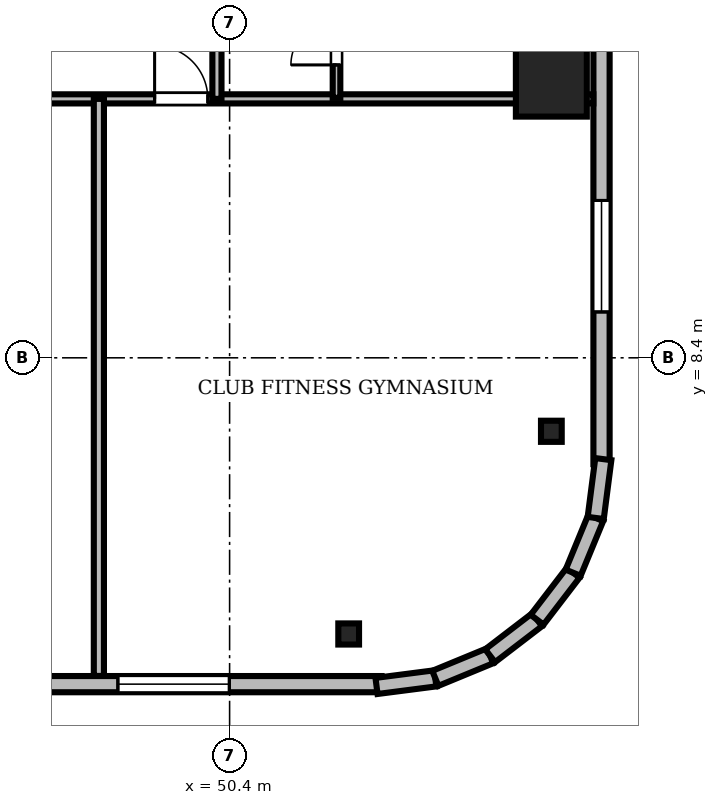
"""IFC4 building model, lengths in metres.
Left out: names, types, materials, properties, quantities, classifications, styles, units other than length and angle.
Written with IfcOpenShell. Run it as: python <this file> out.ifc"""

import sys

from ifc_helpers import new_model, si_unit, direction, frame, frame_2d, origin, origin_2d, place, context, subcontext, project, spatial, rectangle, i_section, extrude, source, transform, mapped, element, fill, save


model = new_model("IFC4")
c1 = context("Model", 3, precision=1e-05, world=origin(), true_north=direction((0.0, 1.0)))
c2 = subcontext(c1, "Body", "Model", "MODEL_VIEW")
j1 = project(units=[si_unit("LENGTHUNIT", "METRE"), si_unit("PLANEANGLEUNIT", "RADIAN")], contexts=[c1])
p1 = place(None, origin())
s1 = spatial("IfcSite", under=j1, at=p1, CompositionType="ELEMENT")
p2 = place(p1, origin())
s2 = spatial("IfcBuilding", under=s1, at=p2, CompositionType="ELEMENT")
p3 = place(p2, frame((0.0, 0.0, 184.8)))
s3 = spatial("IfcBuildingStorey", under=s2, at=p3, CompositionType="ELEMENT", Elevation=184.8)
m1 = source(origin(), c2, "Body", "SweptSolid", [
    extrude(rectangle(XDim=1.4, YDim=1.4, at=origin_2d()), origin(), (0.0, 0.0, 1.0), 3.53),
])
p4 = place(p3, frame((56.75, 13.86, 0.0), z_axis=(0.0, 0.0, 1.0), x_axis=(1.0, 0.0, 0.0)))
e1 = element("IfcColumn", 1, at=p4, inside=s3, PredefinedType="COLUMN", context=c2, shape_type="MappedRepresentation", body=[
    mapped(m1, transform((0.0, 0.0, 0.0), scale=1.0)),
])
m2 = source(origin(), c2, "Body", "SweptSolid", [
    extrude(i_section(OverallWidth=0.409, OverallDepth=0.417, WebThickness=0.021, FlangeThickness=0.033, FilletRadius=0.015, at=origin_2d()), origin(), (0.0, 0.0, 1.0), 3.53),
])
for number, where, z_axis, x_axis in (
    (2, (52.75, 2.95, 0.0), (0.0, 0.0, 1.0), (1.0, 0.0, 0.0)),
    (3, (56.75, 6.95, 0.0), (0.0, 0.0, 1.0), (1.0, 0.0, 0.0)),
):
    element("IfcColumn", number, at=place(p3, frame(where, z_axis=z_axis, x_axis=x_axis)), inside=s3, PredefinedType="COLUMN", context=c2, shape_type="MappedRepresentation", body=[
        mapped(m2, transform((0.0, 0.0, 0.0), scale=1.0)),
    ])
m3 = source(origin(), c2, "Body", "SweptSolid", [
    extrude(rectangle(XDim=15.6, YDim=0.32, at=frame_2d((7.8, 0.0))), origin(), (0.0, 0.0, 1.0), 3.53),
])
p5 = place(p3, frame((37.8, 1.96, 0.0), z_axis=(0.0, 0.0, 1.0), x_axis=(1.0, 0.0, 0.0)))
e4 = element("IfcWall", 4, at=p5, inside=s3, PredefinedType="SOLIDWALL", context=c2, shape_type="MappedRepresentation", body=[
    mapped(m3, transform((0.0, 0.0, 0.0), scale=1.0)),
])
m4 = source(origin(), c2, "Body", "SweptSolid", [
    extrude(rectangle(XDim=2.2, YDim=2.4, at=frame_2d((1.1, 1.2))), frame((0.0, 0.17, 0.0), z_axis=(0.0, -1.0, 0.0), x_axis=(1.0, 0.0, 0.0)), (0.0, 0.0, 1.0), 0.34),
])
p6 = place(p5, frame((10.395, 0.0, 0.72)))
e5 = element("IfcOpeningElement", 5, at=p6, cuts=e4, PredefinedType="OPENING", context=c2, shape_type="MappedRepresentation", body=[
    mapped(m4, transform((0.0, 0.0, 0.0), scale=1.0)),
])
m5 = source(origin(), c2, "Body", "SweptSolid", [
    extrude(rectangle(XDim=1.8, YDim=2.4, at=frame_2d((0.9, 1.2))), frame((0.0, 0.17, 0.0), z_axis=(0.0, -1.0, 0.0), x_axis=(1.0, 0.0, 0.0)), (0.0, 0.0, 1.0), 0.34),
])
p7 = place(p5, frame((6.262, 0.0, 0.72)))
e6 = element("IfcOpeningElement", 6, at=p7, cuts=e4, PredefinedType="OPENING", context=c2, shape_type="MappedRepresentation", body=[
    mapped(m5, transform((0.0, 0.0, 0.0), scale=1.0)),
])
p8 = place(p3, frame((57.74, 6.3, 0.0), z_axis=(0.0, 0.0, 1.0), x_axis=(0.0, 1.0, 0.0)))
e7 = element("IfcWall", 7, at=p8, inside=s3, PredefinedType="SOLIDWALL", context=c2, shape_type="MappedRepresentation", body=[
    mapped(m3, transform((0.0, 0.0, 0.0), scale=1.0)),
])
m6 = source(origin(), c2, "Body", "SweptSolid", [
    extrude(rectangle(XDim=1.4, YDim=2.3, at=frame_2d((0.7, 1.15))), frame((0.0, 0.17, 0.0), z_axis=(0.0, -1.0, 0.0), x_axis=(1.0, 0.0, 0.0)), (0.0, 0.0, 1.0), 0.34),
])
p9 = place(p8, frame((9.61, 0.0, 0.0)))
e8 = element("IfcOpeningElement", 8, at=p9, cuts=e7, PredefinedType="OPENING", context=c2, shape_type="MappedRepresentation", body=[
    mapped(m6, transform((0.0, 0.0, 0.0), scale=1.0)),
])
p10 = place(p8, frame((3.005, 0.0, 0.72)))
e9 = element("IfcOpeningElement", 9, at=p10, cuts=e7, PredefinedType="OPENING", context=c2, shape_type="MappedRepresentation", body=[
    mapped(m4, transform((0.0, 0.0, 0.0), scale=1.0)),
])
m7 = source(origin(), c2, "Body", "SweptSolid", [
    extrude(rectangle(XDim=1.17, YDim=0.32, at=frame_2d((0.585, 0.0))), origin(), (0.0, 0.0, 1.0), 3.53),
])
p11 = place(p3, frame((53.3, 1.925, 0.0), z_axis=(0.0, 0.0, 1.0), x_axis=(0.991762485493, 0.128090485085, 0.0)))
e10 = element("IfcWall", 10, at=p11, inside=s3, PredefinedType="SOLIDWALL", context=c2, shape_type="MappedRepresentation", body=[
    mapped(m7, transform((0.0, 0.0, 0.0), scale=1.0)),
])
m8 = source(origin(), c2, "Body", "SweptSolid", [
    extrude(rectangle(XDim=1.169, YDim=0.32, at=frame_2d((0.585, 0.0))), origin(), (0.0, 0.0, 1.0), 3.53),
])
p12 = place(p3, frame((54.46, 2.074, 0.0), z_axis=(0.0, 0.0, 1.0), x_axis=(0.924479075121, 0.381232789334, 0.0)))
e11 = element("IfcWall", 11, at=p12, inside=s3, PredefinedType="SOLIDWALL", context=c2, shape_type="MappedRepresentation", body=[
    mapped(m8, transform((0.0, 0.0, 0.0), scale=1.0)),
])
m9 = source(origin(), c2, "Body", "SweptSolid", [
    extrude(rectangle(XDim=1.169, YDim=0.32, at=frame_2d((0.584, 0.0))), origin(), (0.0, 0.0, 1.0), 3.53),
])
p13 = place(p3, frame((55.541, 2.52, 0.0), z_axis=(0.0, 0.0, 1.0), x_axis=(0.793663520347, 0.608356981114, 0.0)))
e12 = element("IfcWall", 12, at=p13, inside=s3, PredefinedType="SOLIDWALL", context=c2, shape_type="MappedRepresentation", body=[
    mapped(m9, transform((0.0, 0.0, 0.0), scale=1.0)),
])
m10 = source(origin(), c2, "Body", "SweptSolid", [
    extrude(rectangle(XDim=1.169, YDim=0.32, at=frame_2d((0.584, 0.0))), origin(), (0.0, 0.0, 1.0), 3.53),
])
for number, where, z_axis, x_axis in (
    (13, (56.469, 3.231, 0.0), (0.0, 0.0, 1.0), (0.608, 0.794, 0.0)),
    (14, (57.18, 4.159, 0.0), (0.0, 0.0, 1.0), (0.381, 0.925, 0.0)),
):
    element("IfcWall", number, at=place(p3, frame(where, z_axis=z_axis, x_axis=x_axis)), inside=s3, PredefinedType="SOLIDWALL", context=c2, shape_type="MappedRepresentation", body=[
        mapped(m10, transform((0.0, 0.0, 0.0), scale=1.0)),
    ])
m11 = source(origin(), c2, "Body", "SweptSolid", [
    extrude(rectangle(XDim=1.171, YDim=0.32, at=frame_2d((0.585, 0.0))), origin(), (0.0, 0.0, 1.0), 3.53),
])
p14 = place(p3, frame((57.625, 5.24, 0.0), z_axis=(0.0, 0.0, 1.0), x_axis=(0.128269133229, 0.991739395941, 0.0)))
e15 = element("IfcWall", 15, at=p14, inside=s3, PredefinedType="SOLIDWALL", context=c2, shape_type="MappedRepresentation", body=[
    mapped(m11, transform((0.0, 0.0, 0.0), scale=1.0)),
])
m12 = source(origin(), c2, "Body", "SweptSolid", [
    extrude(rectangle(XDim=46.156, YDim=0.18, at=frame_2d((23.078, 0.0))), origin(), (0.0, 0.0, 1.0), 2.772),
])
p15 = place(p3, frame((11.422, 13.51, 0.0), z_axis=(0.0, 0.0, 1.0), x_axis=(1.0, 0.0, 0.0)))
e16 = element("IfcWall", 16, at=p15, inside=s3, PredefinedType="PARTITIONING", context=c2, shape_type="MappedRepresentation", body=[
    mapped(m12, transform((0.0, 0.0, 0.0), scale=1.0)),
])
m13 = source(origin(), c2, "Body", "SweptSolid", [
    extrude(rectangle(XDim=1.05, YDim=2.2, at=frame_2d((0.525, 1.1))), frame((0.0, 0.1, 0.0), z_axis=(0.0, -1.0, 0.0), x_axis=(1.0, 0.0, 0.0)), (0.0, 0.0, 1.0), 0.2),
])
p16 = place(p15, frame((9.758, 0.0, 0.0)))
e17 = element("IfcOpeningElement", 17, at=p16, cuts=e16, PredefinedType="OPENING", context=c2, shape_type="MappedRepresentation", body=[
    mapped(m13, transform((0.0, 0.0, 0.0), scale=1.0)),
])
p17 = place(p15, frame((12.878, 0.0, 0.0)))
e18 = element("IfcOpeningElement", 18, at=p17, cuts=e16, PredefinedType="OPENING", context=c2, shape_type="MappedRepresentation", body=[
    mapped(m13, transform((0.0, 0.0, 0.0), scale=1.0)),
])
p18 = place(p15, frame((16.893, 0.0, 0.0)))
e19 = element("IfcOpeningElement", 19, at=p18, cuts=e16, PredefinedType="OPENING", context=c2, shape_type="MappedRepresentation", body=[
    mapped(m13, transform((0.0, 0.0, 0.0), scale=1.0)),
])
p19 = place(p15, frame((20.344, 0.0, 0.0)))
e20 = element("IfcOpeningElement", 20, at=p19, cuts=e16, PredefinedType="OPENING", context=c2, shape_type="MappedRepresentation", body=[
    mapped(m13, transform((0.0, 0.0, 0.0), scale=1.0)),
])
p20 = place(p15, frame((24.008, 0.0, 0.0)))
e21 = element("IfcOpeningElement", 21, at=p20, cuts=e16, PredefinedType="OPENING", context=c2, shape_type="MappedRepresentation", body=[
    mapped(m13, transform((0.0, 0.0, 0.0), scale=1.0)),
])
p21 = place(p15, frame((28.055, 0.0, 0.0)))
e22 = element("IfcOpeningElement", 22, at=p21, cuts=e16, PredefinedType="OPENING", context=c2, shape_type="MappedRepresentation", body=[
    mapped(m13, transform((0.0, 0.0, 0.0), scale=1.0)),
])
m14 = source(origin(), c2, "Body", "SweptSolid", [
    extrude(rectangle(XDim=0.95, YDim=2.15, at=frame_2d((0.475, 1.075))), frame((0.0, 0.1, 0.0), z_axis=(0.0, -1.0, 0.0), x_axis=(1.0, 0.0, 0.0)), (0.0, 0.0, 1.0), 0.2),
])
p22 = place(p15, frame((34.246, 0.0, 0.0)))
e23 = element("IfcOpeningElement", 23, at=p22, cuts=e16, PredefinedType="OPENING", context=c2, shape_type="MappedRepresentation", body=[
    mapped(m14, transform((0.0, 0.0, 0.0), scale=1.0)),
])
p23 = place(p15, frame((37.498, 0.0, 0.0)))
e24 = element("IfcOpeningElement", 24, at=p23, cuts=e16, PredefinedType="OPENING", context=c2, shape_type="MappedRepresentation", body=[
    mapped(m13, transform((0.0, 0.0, 0.0), scale=1.0)),
])
m15 = source(origin(), c2, "Body", "SweptSolid", [
    extrude(rectangle(XDim=27.59, YDim=0.18, at=frame_2d((13.795, 0.0))), origin(), (0.0, 0.0, 1.0), 2.972),
])
p24 = place(p3, frame((50.15, 13.51, 0.0), z_axis=(0.0, 0.0, 1.0), x_axis=(0.0, 1.0, 0.0)))
e25 = element("IfcWall", 25, at=p24, inside=s3, PredefinedType="PARTITIONING", context=c2, shape_type="MappedRepresentation", body=[
    mapped(m15, transform((0.0, 0.0, 0.0), scale=1.0)),
])
p25 = place(p24, frame((4.086, 0.0, 0.0)))
e26 = element("IfcOpeningElement", 26, at=p25, cuts=e25, PredefinedType="OPENING", context=c2, shape_type="MappedRepresentation", body=[
    mapped(m13, transform((0.0, 0.0, 0.0), scale=1.0)),
])
p26 = place(p24, frame((9.744, 0.0, 0.0)))
e27 = element("IfcOpeningElement", 27, at=p26, cuts=e25, PredefinedType="OPENING", context=c2, shape_type="MappedRepresentation", body=[
    mapped(m13, transform((0.0, 0.0, 0.0), scale=1.0)),
])
p27 = place(p24, frame((17.771, 0.0, 0.0)))
e28 = element("IfcOpeningElement", 28, at=p27, cuts=e25, PredefinedType="OPENING", context=c2, shape_type="MappedRepresentation", body=[
    mapped(m13, transform((0.0, 0.0, 0.0), scale=1.0)),
])
p28 = place(p24, frame((24.614, 0.0, 0.0)))
e29 = element("IfcOpeningElement", 29, at=p28, cuts=e25, PredefinedType="OPENING", context=c2, shape_type="MappedRepresentation", body=[
    mapped(m13, transform((0.0, 0.0, 0.0), scale=1.0)),
])
m16 = source(origin(), c2, "Body", "SweptSolid", [
    extrude(rectangle(XDim=2.29, YDim=0.15, at=frame_2d((1.145, 0.0))), origin(), (0.0, 0.0, 1.0), 2.972),
])
p29 = place(p3, frame((52.51, 13.53, 0.0), z_axis=(0.0, 0.0, 1.0), x_axis=(0.0, 1.0, 0.0)))
e30 = element("IfcWall", 30, at=p29, inside=s3, PredefinedType="PARTITIONING", context=c2, shape_type="MappedRepresentation", body=[
    mapped(m16, transform((0.0, 0.0, 0.0), scale=1.0)),
])
m17 = source(origin(), c2, "Body", "SweptSolid", [
    extrude(rectangle(XDim=0.9, YDim=2.1, at=frame_2d((0.45, 1.05))), frame((0.0, 0.085, 0.0), z_axis=(0.0, -1.0, 0.0), x_axis=(1.0, 0.0, 0.0)), (0.0, 0.0, 1.0), 0.17),
])
p30 = place(p29, frame((0.65, 0.0, 0.0)))
e31 = element("IfcOpeningElement", 31, at=p30, cuts=e30, PredefinedType="OPENING", context=c2, shape_type="MappedRepresentation", body=[
    mapped(m17, transform((0.0, 0.0, 0.0), scale=1.0)),
])
m18 = source(origin(), c2, "Body", "SweptSolid", [
    extrude(rectangle(XDim=11.388, YDim=0.2, at=frame_2d((5.694, 0.0))), origin(), (0.0, 0.0, 1.0), 2.772),
])
p31 = place(p3, frame((47.82, 2.122, 0.0), z_axis=(0.0, 0.0, 1.0), x_axis=(0.0, 1.0, 0.0)))
e32 = element("IfcWall", 32, at=p31, inside=s3, PredefinedType="PARTITIONING", context=c2, shape_type="MappedRepresentation", body=[
    mapped(m18, transform((0.0, 0.0, 0.0), scale=1.0)),
])
m19 = source(origin(), c2, "Body", "SweptSolid", [
    extrude(rectangle(XDim=2.2, YDim=2.4, at=frame_2d((1.1, 1.2))), frame((0.0, 0.03, 0.0), z_axis=(0.0, -1.0, 0.0), x_axis=(1.0, 0.0, 0.0)), (0.0, 0.0, 1.0), 0.06),
])
p32 = place(p6, origin())
e33 = element("IfcWindow", 33, at=p32, inside=s3, PartitioningType="SINGLE_PANEL", PredefinedType="WINDOW", context=c2, shape_type="MappedRepresentation", body=[
    mapped(m19, transform((0.0, 0.0, 0.0), scale=1.0)),
])
fill(e5, e33)
p33 = place(p10, origin())
e34 = element("IfcWindow", 34, at=p33, inside=s3, PartitioningType="SINGLE_PANEL", PredefinedType="WINDOW", context=c2, shape_type="MappedRepresentation", body=[
    mapped(m19, transform((0.0, 0.0, 0.0), scale=1.0)),
])
fill(e9, e34)
m20 = source(origin(), c2, "Body", "SweptSolid", [
    extrude(rectangle(XDim=1.05, YDim=2.2, at=frame_2d((0.525, 1.1))), frame((0.0, 0.025, 0.0), z_axis=(0.0, -1.0, 0.0), x_axis=(1.0, 0.0, 0.0)), (0.0, 0.0, 1.0), 0.05),
])
p34 = place(p23, origin())
e35 = element("IfcDoor", 35, at=p34, inside=s3, OperationType="SINGLE_SWING_LEFT", PredefinedType="DOOR", context=c2, shape_type="MappedRepresentation", body=[
    mapped(m20, transform((0.0, 0.0, 0.0), scale=1.0)),
])
fill(e24, e35)
m21 = source(origin(), c2, "Body", "SweptSolid", [
    extrude(rectangle(XDim=0.9, YDim=2.1, at=frame_2d((0.45, 1.05))), frame((0.0, 0.025, 0.0), z_axis=(0.0, -1.0, 0.0), x_axis=(1.0, 0.0, 0.0)), (0.0, 0.0, 1.0), 0.05),
])
p35 = place(p30, origin())
e36 = element("IfcDoor", 36, at=p35, inside=s3, OperationType="SINGLE_SWING_LEFT", PredefinedType="DOOR", context=c2, shape_type="MappedRepresentation", body=[
    mapped(m21, transform((0.0, 0.0, 0.0), scale=1.0)),
])
fill(e31, e36)
save(model, sys.argv[1])
